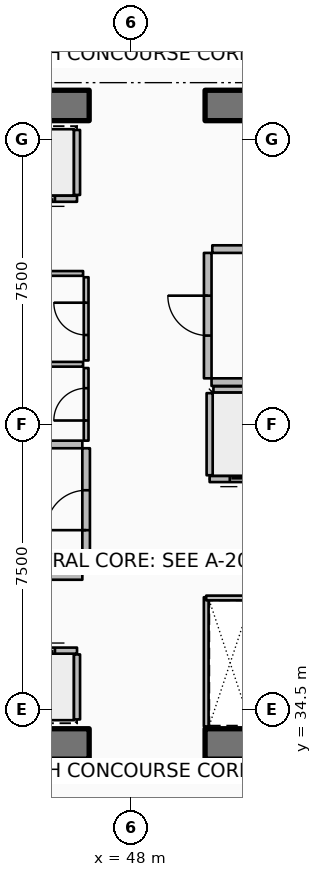
"""IFC4 building model, lengths in metres.
Left out: names, types, materials, properties, quantities, classifications, styles, units other than length and angle.
Written with IfcOpenShell. Run it as: python <this file> out.ifc"""

import sys

from ifc_helpers import new_model, si_unit, direction, frame, frame_2d, origin, place, context, subcontext, project, spatial, rectangle, extrude, element, fill, save


model = new_model("IFC4")
c1 = context("Model", 3, precision=1e-05, world=origin(), true_north=direction((0.0, 1.0)))
c2 = subcontext(c1, "Body", "Model", "MODEL_VIEW")
j1 = project(units=[si_unit("LENGTHUNIT", "METRE"), si_unit("PLANEANGLEUNIT", "RADIAN")], contexts=[c1])
p1 = place(None, origin())
s1 = spatial("IfcSite", under=j1, at=p1, CompositionType="ELEMENT")
p2 = place(p1, origin())
s2 = spatial("IfcBuilding", under=s1, at=p2, CompositionType="ELEMENT")
p3 = place(p2, frame((0.0, 0.0, 123.0)))
s3 = spatial("IfcBuildingStorey", under=s2, at=p3, CompositionType="ELEMENT", Elevation=123.0)
p4 = place(p3, frame((37.0, 33.6, 0.0), z_axis=(0.0, 0.0, 1.0), x_axis=(1.0, 0.0, 0.0)))
e1 = element("IfcWall", 1, at=p4, inside=s3, PredefinedType="SHEAR", context=c2, shape_type="SweptSolid", body=[
    extrude(rectangle(XDim=9.9, YDim=0.8, at=frame_2d((4.95, 0.0))), origin(), (0.0, 0.0, 1.0), 4.8),
])
p5 = place(p3, frame((49.95, 33.6, 0.0), z_axis=(0.0, 0.0, 1.0), x_axis=(1.0, 0.0, 0.0)))
e2 = element("IfcWall", 2, at=p5, inside=s3, PredefinedType="SHEAR", context=c2, shape_type="SweptSolid", body=[
    extrude(rectangle(XDim=9.9, YDim=0.8, at=frame_2d((4.95, 0.0))), origin(), (0.0, 0.0, 1.0), 4.8),
])
p6 = place(p3, frame((37.0, 50.4, 0.0), z_axis=(0.0, 0.0, 1.0), x_axis=(1.0, 0.0, 0.0)))
e3 = element("IfcWall", 3, at=p6, inside=s3, PredefinedType="SHEAR", context=c2, shape_type="SweptSolid", body=[
    extrude(rectangle(XDim=9.9, YDim=0.8, at=frame_2d((4.95, 0.0))), origin(), (0.0, 0.0, 1.0), 4.8),
])
p7 = place(p3, frame((49.95, 50.4, 0.0), z_axis=(0.0, 0.0, 1.0), x_axis=(1.0, 0.0, 0.0)))
e4 = element("IfcWall", 4, at=p7, inside=s3, PredefinedType="SHEAR", context=c2, shape_type="SweptSolid", body=[
    extrude(rectangle(XDim=9.9, YDim=0.8, at=frame_2d((4.95, 0.0))), origin(), (0.0, 0.0, 1.0), 4.8),
])
p8 = place(p3, frame((46.58, 47.945, 0.0), z_axis=(0.0, 0.0, 1.0), x_axis=(-1.0, 0.0, 0.0)))
e5 = element("IfcWall", 5, at=p8, inside=s3, PredefinedType="PARTITIONING", context=c2, shape_type="SweptSolid", body=[
    extrude(rectangle(XDim=2.26, YDim=0.16, at=frame_2d((1.13, 0.0))), origin(), (0.0, 0.0, 1.0), 4.4),
])
p9 = place(p8, frame((0.58, 0.0, 0.0)))
e6 = element("IfcOpeningElement", 6, at=p9, cuts=e5, PredefinedType="OPENING", context=c2, shape_type="SweptSolid", body=[
    extrude(rectangle(XDim=1.1, YDim=2.1, at=frame_2d((0.55, 1.05))), frame((0.0, 0.09, 0.0), z_axis=(0.0, -1.0, 0.0), x_axis=(1.0, 0.0, 0.0)), (0.0, 0.0, 1.0), 0.18),
])
p10 = place(p3, frame((46.58, 48.045, 0.0), z_axis=(0.0, 0.0, 1.0), x_axis=(0.0, 1.0, 0.0)))
e7 = element("IfcWall", 7, at=p10, inside=s3, PredefinedType="PARTITIONING", context=c2, shape_type="SweptSolid", body=[
    extrude(rectangle(XDim=1.71, YDim=0.16, at=frame_2d((0.855, 0.0))), origin(), (0.0, 0.0, 1.0), 4.4),
])
p11 = place(p3, frame((44.32, 36.055, 0.0), z_axis=(0.0, 0.0, 1.0), x_axis=(1.0, 0.0, 0.0)))
e8 = element("IfcWall", 8, at=p11, inside=s3, PredefinedType="PARTITIONING", context=c2, shape_type="SweptSolid", body=[
    extrude(rectangle(XDim=2.26, YDim=0.16, at=frame_2d((1.13, 0.0))), origin(), (0.0, 0.0, 1.0), 4.4),
])
p12 = place(p11, frame((0.58, 0.0, 0.0)))
e9 = element("IfcOpeningElement", 9, at=p12, cuts=e8, PredefinedType="OPENING", context=c2, shape_type="SweptSolid", body=[
    extrude(rectangle(XDim=1.1, YDim=2.1, at=frame_2d((0.55, 1.05))), frame((0.0, 0.09, 0.0), z_axis=(0.0, -1.0, 0.0), x_axis=(1.0, 0.0, 0.0)), (0.0, 0.0, 1.0), 0.18),
])
p13 = place(p3, frame((46.58, 34.245, 0.0), z_axis=(0.0, 0.0, 1.0), x_axis=(0.0, 1.0, 0.0)))
e10 = element("IfcWall", 10, at=p13, inside=s3, PredefinedType="PARTITIONING", context=c2, shape_type="SweptSolid", body=[
    extrude(rectangle(XDim=1.71, YDim=0.16, at=frame_2d((0.855, 0.0))), origin(), (0.0, 0.0, 1.0), 4.4),
])
p14 = place(p3, frame((52.23, 40.57, 0.0), z_axis=(0.0, 0.0, 1.0), x_axis=(-1.0, 0.0, 0.0)))
e11 = element("IfcWall", 11, at=p14, inside=s3, PredefinedType="PARTITIONING", context=c2, shape_type="SweptSolid", body=[
    extrude(rectangle(XDim=2.16, YDim=0.16, at=frame_2d((1.08, 0.0))), origin(), (0.0, 0.0, 1.0), 4.4),
])
p15 = place(p14, frame((0.53, 0.0, 0.0)))
e12 = element("IfcOpeningElement", 12, at=p15, cuts=e11, PredefinedType="OPENING", context=c2, shape_type="SweptSolid", body=[
    extrude(rectangle(XDim=1.1, YDim=2.1, at=frame_2d((0.55, 1.05))), frame((0.0, 0.09, 0.0), z_axis=(0.0, -1.0, 0.0), x_axis=(1.0, 0.0, 0.0)), (0.0, 0.0, 1.0), 0.18),
])
p16 = place(p3, frame((50.07, 40.67, 0.0), z_axis=(0.0, 0.0, 1.0), x_axis=(0.0, 1.0, 0.0)))
e13 = element("IfcWall", 13, at=p16, inside=s3, PredefinedType="PARTITIONING", context=c2, shape_type="SweptSolid", body=[
    extrude(rectangle(XDim=2.16, YDim=0.16, at=frame_2d((1.08, 0.0))), origin(), (0.0, 0.0, 1.0), 4.4),
])
p17 = place(p3, frame((50.17, 42.93, 0.0), z_axis=(0.0, 0.0, 1.0), x_axis=(1.0, 0.0, 0.0)))
e14 = element("IfcWall", 14, at=p17, inside=s3, PredefinedType="PARTITIONING", context=c2, shape_type="SweptSolid", body=[
    extrude(rectangle(XDim=1.96, YDim=0.16, at=frame_2d((0.98, 0.0))), origin(), (0.0, 0.0, 1.0), 4.4),
])
p18 = place(p3, frame((41.35, 38.02, 0.0), z_axis=(0.0, 0.0, 1.0), x_axis=(1.0, 0.0, 0.0)))
e15 = element("IfcWall", 15, at=p18, inside=s3, PredefinedType="PARTITIONING", context=c2, shape_type="SweptSolid", body=[
    extrude(rectangle(XDim=5.37, YDim=0.2, at=frame_2d((2.685, 0.0))), origin(), (0.0, 0.0, 1.0), 4.4),
])
p19 = place(p3, frame((43.92, 41.48, 0.0), z_axis=(0.0, 0.0, 1.0), x_axis=(1.0, 0.0, 0.0)))
e16 = element("IfcWall", 16, at=p19, inside=s3, PredefinedType="PARTITIONING", context=c2, shape_type="SweptSolid", body=[
    extrude(rectangle(XDim=2.8, YDim=0.2, at=frame_2d((1.4, 0.0))), origin(), (0.0, 0.0, 1.0), 4.4),
])
p20 = place(p3, frame((46.82, 38.12, 0.0), z_axis=(0.0, 0.0, 1.0), x_axis=(0.0, 1.0, 0.0)))
e17 = element("IfcWall", 17, at=p20, inside=s3, PredefinedType="PARTITIONING", context=c2, shape_type="SweptSolid", body=[
    extrude(rectangle(XDim=3.26, YDim=0.2, at=frame_2d((1.63, 0.0))), origin(), (0.0, 0.0, 1.0), 4.4),
])
p21 = place(p20, frame((1.105, 0.0, 0.0)))
e18 = element("IfcOpeningElement", 18, at=p21, cuts=e17, PredefinedType="OPENING", context=c2, shape_type="SweptSolid", body=[
    extrude(rectangle(XDim=1.05, YDim=2.1, at=frame_2d((0.525, 1.05))), frame((0.0, 0.11, 0.0), z_axis=(0.0, -1.0, 0.0), x_axis=(1.0, 0.0, 0.0)), (0.0, 0.0, 1.0), 0.22),
])
p22 = place(p3, frame((50.12, 43.12, 0.0), z_axis=(0.0, 0.0, 1.0), x_axis=(1.0, 0.0, 0.0)))
e19 = element("IfcWall", 19, at=p22, inside=s3, PredefinedType="PARTITIONING", context=c2, shape_type="SweptSolid", body=[
    extrude(rectangle(XDim=8.88, YDim=0.2, at=frame_2d((4.44, 0.0))), origin(), (0.0, 0.0, 1.0), 4.4),
])
p23 = place(p3, frame((50.14, 46.62, 0.0), z_axis=(0.0, 0.0, 1.0), x_axis=(1.0, 0.0, 0.0)))
e20 = element("IfcWall", 20, at=p23, inside=s3, PredefinedType="PARTITIONING", context=c2, shape_type="SweptSolid", body=[
    extrude(rectangle(XDim=1.02, YDim=0.2, at=frame_2d((0.51, 0.0))), origin(), (0.0, 0.0, 1.0), 4.4),
])
p24 = place(p3, frame((50.02, 43.22, 0.0), z_axis=(0.0, 0.0, 1.0), x_axis=(0.0, 1.0, 0.0)))
e21 = element("IfcWall", 21, at=p24, inside=s3, PredefinedType="PARTITIONING", context=c2, shape_type="SweptSolid", body=[
    extrude(rectangle(XDim=3.3, YDim=0.2, at=frame_2d((1.65, 0.0))), origin(), (0.0, 0.0, 1.0), 4.4),
])
p25 = place(p24, frame((1.125, 0.0, 0.0)))
e22 = element("IfcOpeningElement", 22, at=p25, cuts=e21, PredefinedType="OPENING", context=c2, shape_type="SweptSolid", body=[
    extrude(rectangle(XDim=1.05, YDim=2.1, at=frame_2d((0.525, 1.05))), frame((0.0, 0.11, 0.0), z_axis=(0.0, -1.0, 0.0), x_axis=(1.0, 0.0, 0.0)), (0.0, 0.0, 1.0), 0.22),
])
p26 = place(p3, frame((49.98, 34.06, 0.0), z_axis=(0.0, 0.0, 1.0), x_axis=(0.0, 1.0, 0.0)))
e23 = element("IfcWall", 23, at=p26, inside=s3, PredefinedType="PARTITIONING", context=c2, shape_type="SweptSolid", body=[
    extrude(rectangle(XDim=3.4, YDim=0.125, at=frame_2d((1.7, 0.0))), origin(), (0.0, 0.0, 1.0), 3.84),
])
p27 = place(p3, frame((49.98, 37.44, 0.0), z_axis=(0.0, 0.0, 1.0), x_axis=(1.0, 0.0, 0.0)))
e24 = element("IfcWall", 24, at=p27, inside=s3, PredefinedType="PARTITIONING", context=c2, shape_type="SweptSolid", body=[
    extrude(rectangle(XDim=1.26, YDim=0.125, at=frame_2d((0.63, 0.0))), origin(), (0.0, 0.0, 1.0), 3.84),
])
p28 = place(p3, frame((44.03, 43.59, 0.0), z_axis=(0.0, 0.0, 1.0), x_axis=(1.0, 0.0, 0.0)))
e25 = element("IfcWall", 25, at=p28, inside=s3, PredefinedType="PARTITIONING", context=c2, shape_type="SweptSolid", body=[
    extrude(rectangle(XDim=2.71, YDim=0.125, at=frame_2d((1.355, 0.0))), origin(), (0.0, 0.0, 1.0), 3.84),
])
p29 = place(p3, frame((46.82, 41.58, 0.0), z_axis=(0.0, 0.0, 1.0), x_axis=(0.0, 1.0, 0.0)))
e26 = element("IfcWall", 26, at=p29, inside=s3, PredefinedType="PARTITIONING", context=c2, shape_type="SweptSolid", body=[
    extrude(rectangle(XDim=1.91, YDim=0.125, at=frame_2d((0.955, 0.0))), origin(), (0.0, 0.0, 1.0), 3.84),
])
p30 = place(p29, frame((0.53, 0.0, 0.0)))
e27 = element("IfcOpeningElement", 27, at=p30, cuts=e26, PredefinedType="OPENING", context=c2, shape_type="SweptSolid", body=[
    extrude(rectangle(XDim=0.85, YDim=2.06, at=frame_2d((0.425, 1.03))), frame((0.0, 0.073, 0.0), z_axis=(0.0, -1.0, 0.0), x_axis=(1.0, 0.0, 0.0)), (0.0, 0.0, 1.0), 0.145),
])
p31 = place(p3, frame((46.82, 43.69, 0.0), z_axis=(0.0, 0.0, 1.0), x_axis=(0.0, 1.0, 0.0)))
e28 = element("IfcWall", 28, at=p31, inside=s3, PredefinedType="PARTITIONING", context=c2, shape_type="SweptSolid", body=[
    extrude(rectangle(XDim=2.19, YDim=0.125, at=frame_2d((1.095, 0.0))), origin(), (0.0, 0.0, 1.0), 3.84),
])
p32 = place(p31, frame((0.67, 0.0, 0.0)))
e29 = element("IfcOpeningElement", 29, at=p32, cuts=e28, PredefinedType="OPENING", context=c2, shape_type="SweptSolid", body=[
    extrude(rectangle(XDim=0.85, YDim=2.06, at=frame_2d((0.425, 1.03))), frame((0.0, 0.073, 0.0), z_axis=(0.0, -1.0, 0.0), x_axis=(1.0, 0.0, 0.0)), (0.0, 0.0, 1.0), 0.145),
])
p33 = place(p3, frame((45.48, 45.98, 0.0), z_axis=(0.0, 0.0, 1.0), x_axis=(1.0, 0.0, 0.0)))
e30 = element("IfcWall", 30, at=p33, inside=s3, PredefinedType="PARTITIONING", context=c2, shape_type="SweptSolid", body=[
    extrude(rectangle(XDim=1.26, YDim=0.125, at=frame_2d((0.63, 0.0))), origin(), (0.0, 0.0, 1.0), 3.84),
])
p34 = place(p9, origin())
e31 = element("IfcDoor", 31, at=p34, inside=s3, OperationType="DOUBLE_DOOR_SLIDING", PredefinedType="DOOR", context=c2, shape_type="SweptSolid", body=[
    extrude(rectangle(XDim=1.1, YDim=2.1, at=frame_2d((0.55, 1.05))), frame((0.0, 0.025, 0.0), z_axis=(0.0, -1.0, 0.0), x_axis=(1.0, 0.0, 0.0)), (0.0, 0.0, 1.0), 0.05),
])
fill(e6, e31)
p35 = place(p12, origin())
e32 = element("IfcDoor", 32, at=p35, inside=s3, OperationType="DOUBLE_DOOR_SLIDING", PredefinedType="DOOR", context=c2, shape_type="SweptSolid", body=[
    extrude(rectangle(XDim=1.1, YDim=2.1, at=frame_2d((0.55, 1.05))), frame((0.0, 0.025, 0.0), z_axis=(0.0, -1.0, 0.0), x_axis=(1.0, 0.0, 0.0)), (0.0, 0.0, 1.0), 0.05),
])
fill(e9, e32)
p36 = place(p15, origin())
e33 = element("IfcDoor", 33, at=p36, inside=s3, OperationType="DOUBLE_DOOR_SLIDING", PredefinedType="DOOR", context=c2, shape_type="SweptSolid", body=[
    extrude(rectangle(XDim=1.1, YDim=2.1, at=frame_2d((0.55, 1.05))), frame((0.0, 0.025, 0.0), z_axis=(0.0, -1.0, 0.0), x_axis=(1.0, 0.0, 0.0)), (0.0, 0.0, 1.0), 0.05),
])
fill(e12, e33)
p37 = place(p21, origin())
e34 = element("IfcDoor", 34, at=p37, inside=s3, OperationType="SINGLE_SWING_LEFT", PredefinedType="DOOR", context=c2, shape_type="SweptSolid", body=[
    extrude(rectangle(XDim=1.05, YDim=2.1, at=frame_2d((0.525, 1.05))), frame((0.0, 0.025, 0.0), z_axis=(0.0, -1.0, 0.0), x_axis=(1.0, 0.0, 0.0)), (0.0, 0.0, 1.0), 0.05),
])
fill(e18, e34)
p38 = place(p25, origin())
e35 = element("IfcDoor", 35, at=p38, inside=s3, OperationType="SINGLE_SWING_RIGHT", PredefinedType="DOOR", context=c2, shape_type="SweptSolid", body=[
    extrude(rectangle(XDim=1.05, YDim=2.1, at=frame_2d((0.525, 1.05))), frame((0.0, 0.025, 0.0), z_axis=(0.0, -1.0, 0.0), x_axis=(1.0, 0.0, 0.0)), (0.0, 0.0, 1.0), 0.05),
])
fill(e22, e35)
p39 = place(p30, origin())
e36 = element("IfcDoor", 36, at=p39, inside=s3, OperationType="SINGLE_SWING_LEFT", PredefinedType="DOOR", context=c2, shape_type="SweptSolid", body=[
    extrude(rectangle(XDim=0.85, YDim=2.06, at=frame_2d((0.425, 1.03))), frame((0.0, 0.025, 0.0), z_axis=(0.0, -1.0, 0.0), x_axis=(1.0, 0.0, 0.0)), (0.0, 0.0, 1.0), 0.05),
])
fill(e27, e36)
p40 = place(p32, origin())
e37 = element("IfcDoor", 37, at=p40, inside=s3, OperationType="SINGLE_SWING_RIGHT", PredefinedType="DOOR", context=c2, shape_type="SweptSolid", body=[
    extrude(rectangle(XDim=0.85, YDim=2.06, at=frame_2d((0.425, 1.03))), frame((0.0, 0.025, 0.0), z_axis=(0.0, -1.0, 0.0), x_axis=(1.0, 0.0, 0.0)), (0.0, 0.0, 1.0), 0.05),
])
fill(e29, e37)
save(model, sys.argv[1])
